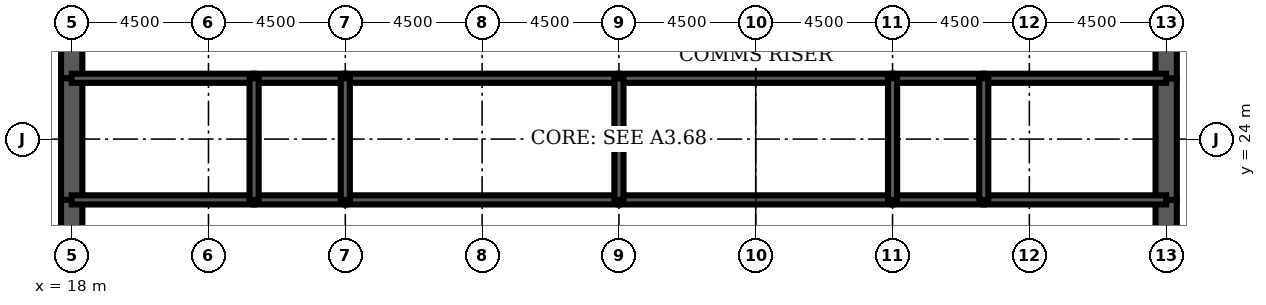
"""IFC4 building model, lengths in metres.
Left out: names, types, materials, properties, quantities, classifications, styles, units other than length and angle.
Written with IfcOpenShell. Run it as: python <this file> out.ifc"""

import sys

from ifc_helpers import new_model, si_unit, direction, frame, frame_2d, origin, place, context, subcontext, project, spatial, rectangle, extrude, element, fill, save


model = new_model("IFC4")
c1 = context("Model", 3, precision=1e-05, world=origin(), true_north=direction((0.0, 1.0)))
c2 = subcontext(c1, "Body", "Model", "MODEL_VIEW")
j1 = project(units=[si_unit("LENGTHUNIT", "METRE"), si_unit("PLANEANGLEUNIT", "RADIAN")], contexts=[c1])
p1 = place(None, origin())
s1 = spatial("IfcSite", under=j1, at=p1, CompositionType="ELEMENT")
p2 = place(p1, origin())
s2 = spatial("IfcBuilding", under=s1, at=p2, CompositionType="ELEMENT")
p3 = place(p2, frame((0.0, 0.0, 292.1)))
s3 = spatial("IfcBuildingStorey", under=s2, at=p3, CompositionType="ELEMENT", Elevation=292.1)
p4 = place(p3, frame((18.0, 28.8, 0.0), z_axis=(0.0, 0.0, 1.0), x_axis=(0.0, -1.0, 0.0)))
e1 = element("IfcWall", 1, at=p4, inside=s3, PredefinedType="SHEAR", context=c2, shape_type="SweptSolid", body=[
    extrude(rectangle(XDim=2.8, YDim=0.7, at=frame_2d((1.4, 0.0))), origin(), (0.0, 0.0, 1.0), 4.2),
])
p5 = place(p4, frame((0.4, 0.0, 0.0)))
e2 = element("IfcOpeningElement", 2, at=p5, cuts=e1, PredefinedType="OPENING", context=c2, shape_type="SweptSolid", body=[
    extrude(rectangle(XDim=1.8, YDim=2.1, at=frame_2d((0.9, 1.05))), frame((0.0, 0.36, 0.0), z_axis=(0.0, -1.0, 0.0), x_axis=(1.0, 0.0, 0.0)), (0.0, 0.0, 1.0), 0.72),
])
p6 = place(p3, frame((18.0, 26.0, 0.0), z_axis=(0.0, 0.0, 1.0), x_axis=(0.0, -1.0, 0.0)))
e3 = element("IfcWall", 3, at=p6, inside=s3, PredefinedType="SHEAR", context=c2, shape_type="SweptSolid", body=[
    extrude(rectangle(XDim=4.0, YDim=0.7, at=frame_2d((2.0, 0.0))), origin(), (0.0, 0.0, 1.0), 4.2),
])
p7 = place(p3, frame((18.0, 22.0, 0.0), z_axis=(0.0, 0.0, 1.0), x_axis=(0.0, -1.0, 0.0)))
e4 = element("IfcWall", 4, at=p7, inside=s3, PredefinedType="SHEAR", context=c2, shape_type="SweptSolid", body=[
    extrude(rectangle(XDim=2.8, YDim=0.7, at=frame_2d((1.4, 0.0))), origin(), (0.0, 0.0, 1.0), 4.2),
])
p8 = place(p7, frame((0.6, 0.0, 0.0)))
e5 = element("IfcOpeningElement", 5, at=p8, cuts=e4, PredefinedType="OPENING", context=c2, shape_type="SweptSolid", body=[
    extrude(rectangle(XDim=1.8, YDim=2.1, at=frame_2d((0.9, 1.05))), frame((0.0, 0.36, 0.0), z_axis=(0.0, -1.0, 0.0), x_axis=(1.0, 0.0, 0.0)), (0.0, 0.0, 1.0), 0.72),
])
p9 = place(p3, frame((54.0, 19.2, 0.0), z_axis=(0.0, 0.0, 1.0), x_axis=(0.0, 1.0, 0.0)))
e6 = element("IfcWall", 6, at=p9, inside=s3, PredefinedType="SHEAR", context=c2, shape_type="SweptSolid", body=[
    extrude(rectangle(XDim=2.8, YDim=0.7, at=frame_2d((1.4, 0.0))), origin(), (0.0, 0.0, 1.0), 4.2),
])
p10 = place(p9, frame((0.4, 0.0, 0.0)))
e7 = element("IfcOpeningElement", 7, at=p10, cuts=e6, PredefinedType="OPENING", context=c2, shape_type="SweptSolid", body=[
    extrude(rectangle(XDim=1.8, YDim=2.1, at=frame_2d((0.9, 1.05))), frame((0.0, 0.36, 0.0), z_axis=(0.0, -1.0, 0.0), x_axis=(1.0, 0.0, 0.0)), (0.0, 0.0, 1.0), 0.72),
])
p11 = place(p3, frame((54.0, 22.0, 0.0), z_axis=(0.0, 0.0, 1.0), x_axis=(0.0, 1.0, 0.0)))
e8 = element("IfcWall", 8, at=p11, inside=s3, PredefinedType="SHEAR", context=c2, shape_type="SweptSolid", body=[
    extrude(rectangle(XDim=4.0, YDim=0.7, at=frame_2d((2.0, 0.0))), origin(), (0.0, 0.0, 1.0), 4.2),
])
p12 = place(p3, frame((54.0, 26.0, 0.0), z_axis=(0.0, 0.0, 1.0), x_axis=(0.0, 1.0, 0.0)))
e9 = element("IfcWall", 9, at=p12, inside=s3, PredefinedType="SHEAR", context=c2, shape_type="SweptSolid", body=[
    extrude(rectangle(XDim=2.8, YDim=0.7, at=frame_2d((1.4, 0.0))), origin(), (0.0, 0.0, 1.0), 4.2),
])
p13 = place(p12, frame((0.6, 0.0, 0.0)))
e10 = element("IfcOpeningElement", 10, at=p13, cuts=e9, PredefinedType="OPENING", context=c2, shape_type="SweptSolid", body=[
    extrude(rectangle(XDim=1.8, YDim=2.1, at=frame_2d((0.9, 1.05))), frame((0.0, 0.36, 0.0), z_axis=(0.0, -1.0, 0.0), x_axis=(1.0, 0.0, 0.0)), (0.0, 0.0, 1.0), 0.72),
])
p14 = place(p3, frame((18.0, 22.0, 0.0), z_axis=(0.0, 0.0, 1.0), x_axis=(1.0, 0.0, 0.0)))
e11 = element("IfcWall", 11, at=p14, inside=s3, PredefinedType="SOLIDWALL", context=c2, shape_type="SweptSolid", body=[
    extrude(rectangle(XDim=6.0, YDim=0.3, at=frame_2d((3.0, 0.0))), origin(), (0.0, 0.0, 1.0), 4.2),
])
p15 = place(p14, frame((2.0, 0.0, 0.0)))
e12 = element("IfcOpeningElement", 12, at=p15, cuts=e11, PredefinedType="OPENING", context=c2, shape_type="SweptSolid", body=[
    extrude(rectangle(XDim=1.0, YDim=2.1, at=frame_2d((0.5, 1.05))), frame((0.0, 0.16, 0.0), z_axis=(0.0, -1.0, 0.0), x_axis=(1.0, 0.0, 0.0)), (0.0, 0.0, 1.0), 0.32),
])
p16 = place(p3, frame((24.0, 22.0, 0.0), z_axis=(0.0, 0.0, 1.0), x_axis=(1.0, 0.0, 0.0)))
e13 = element("IfcWall", 13, at=p16, inside=s3, PredefinedType="SOLIDWALL", context=c2, shape_type="SweptSolid", body=[
    extrude(rectangle(XDim=3.0, YDim=0.3, at=frame_2d((1.5, 0.0))), origin(), (0.0, 0.0, 1.0), 4.2),
])
p17 = place(p16, frame((1.0, 0.0, 0.0)))
e14 = element("IfcOpeningElement", 14, at=p17, cuts=e13, PredefinedType="OPENING", context=c2, shape_type="SweptSolid", body=[
    extrude(rectangle(XDim=1.0, YDim=2.1, at=frame_2d((0.5, 1.05))), frame((0.0, 0.16, 0.0), z_axis=(0.0, -1.0, 0.0), x_axis=(1.0, 0.0, 0.0)), (0.0, 0.0, 1.0), 0.32),
])
p18 = place(p3, frame((27.0, 22.0, 0.0), z_axis=(0.0, 0.0, 1.0), x_axis=(1.0, 0.0, 0.0)))
e15 = element("IfcWall", 15, at=p18, inside=s3, PredefinedType="SOLIDWALL", context=c2, shape_type="SweptSolid", body=[
    extrude(rectangle(XDim=9.0, YDim=0.3, at=frame_2d((4.5, 0.0))), origin(), (0.0, 0.0, 1.0), 4.2),
])
p19 = place(p18, frame((4.0, 0.0, 0.0)))
e16 = element("IfcOpeningElement", 16, at=p19, cuts=e15, PredefinedType="OPENING", context=c2, shape_type="SweptSolid", body=[
    extrude(rectangle(XDim=1.0, YDim=2.1, at=frame_2d((0.5, 1.05))), frame((0.0, 0.16, 0.0), z_axis=(0.0, -1.0, 0.0), x_axis=(1.0, 0.0, 0.0)), (0.0, 0.0, 1.0), 0.32),
])
p20 = place(p3, frame((36.0, 22.0, 0.0), z_axis=(0.0, 0.0, 1.0), x_axis=(1.0, 0.0, 0.0)))
e17 = element("IfcWall", 17, at=p20, inside=s3, PredefinedType="SOLIDWALL", context=c2, shape_type="SweptSolid", body=[
    extrude(rectangle(XDim=9.0, YDim=0.3, at=frame_2d((4.5, 0.0))), origin(), (0.0, 0.0, 1.0), 4.2),
])
p21 = place(p20, frame((4.0, 0.0, 0.0)))
e18 = element("IfcOpeningElement", 18, at=p21, cuts=e17, PredefinedType="OPENING", context=c2, shape_type="SweptSolid", body=[
    extrude(rectangle(XDim=1.0, YDim=2.1, at=frame_2d((0.5, 1.05))), frame((0.0, 0.16, 0.0), z_axis=(0.0, -1.0, 0.0), x_axis=(1.0, 0.0, 0.0)), (0.0, 0.0, 1.0), 0.32),
])
p22 = place(p3, frame((45.0, 22.0, 0.0), z_axis=(0.0, 0.0, 1.0), x_axis=(1.0, 0.0, 0.0)))
e19 = element("IfcWall", 19, at=p22, inside=s3, PredefinedType="SOLIDWALL", context=c2, shape_type="SweptSolid", body=[
    extrude(rectangle(XDim=3.0, YDim=0.3, at=frame_2d((1.5, 0.0))), origin(), (0.0, 0.0, 1.0), 4.2),
])
p23 = place(p22, frame((1.0, 0.0, 0.0)))
e20 = element("IfcOpeningElement", 20, at=p23, cuts=e19, PredefinedType="OPENING", context=c2, shape_type="SweptSolid", body=[
    extrude(rectangle(XDim=1.0, YDim=2.1, at=frame_2d((0.5, 1.05))), frame((0.0, 0.16, 0.0), z_axis=(0.0, -1.0, 0.0), x_axis=(1.0, 0.0, 0.0)), (0.0, 0.0, 1.0), 0.32),
])
p24 = place(p3, frame((48.0, 22.0, 0.0), z_axis=(0.0, 0.0, 1.0), x_axis=(1.0, 0.0, 0.0)))
e21 = element("IfcWall", 21, at=p24, inside=s3, PredefinedType="SOLIDWALL", context=c2, shape_type="SweptSolid", body=[
    extrude(rectangle(XDim=6.0, YDim=0.3, at=frame_2d((3.0, 0.0))), origin(), (0.0, 0.0, 1.0), 4.2),
])
p25 = place(p24, frame((2.0, 0.0, 0.0)))
e22 = element("IfcOpeningElement", 22, at=p25, cuts=e21, PredefinedType="OPENING", context=c2, shape_type="SweptSolid", body=[
    extrude(rectangle(XDim=1.0, YDim=2.1, at=frame_2d((0.5, 1.05))), frame((0.0, 0.16, 0.0), z_axis=(0.0, -1.0, 0.0), x_axis=(1.0, 0.0, 0.0)), (0.0, 0.0, 1.0), 0.32),
])
p26 = place(p24, frame((4.25, 0.0, 0.0)))
e23 = element("IfcOpeningElement", 23, at=p26, cuts=e21, PredefinedType="OPENING", context=c2, shape_type="SweptSolid", body=[
    extrude(rectangle(XDim=1.0, YDim=2.1, at=frame_2d((0.5, 1.05))), frame((0.0, 0.16, 0.0), z_axis=(0.0, -1.0, 0.0), x_axis=(1.0, 0.0, 0.0)), (0.0, 0.0, 1.0), 0.32),
])
p27 = place(p3, frame((18.0, 26.0, 0.0), z_axis=(0.0, 0.0, 1.0), x_axis=(1.0, 0.0, 0.0)))
e24 = element("IfcWall", 24, at=p27, inside=s3, PredefinedType="SOLIDWALL", context=c2, shape_type="SweptSolid", body=[
    extrude(rectangle(XDim=6.0, YDim=0.3, at=frame_2d((3.0, 0.0))), origin(), (0.0, 0.0, 1.0), 4.2),
])
p28 = place(p3, frame((24.0, 26.0, 0.0), z_axis=(0.0, 0.0, 1.0), x_axis=(1.0, 0.0, 0.0)))
e25 = element("IfcWall", 25, at=p28, inside=s3, PredefinedType="SOLIDWALL", context=c2, shape_type="SweptSolid", body=[
    extrude(rectangle(XDim=3.0, YDim=0.3, at=frame_2d((1.5, 0.0))), origin(), (0.0, 0.0, 1.0), 4.2),
])
for number, where, z_axis, x_axis in (
    (26, (27.0, 26.0, 0.0), (0.0, 0.0, 1.0), (1.0, 0.0, 0.0)),
    (27, (36.0, 26.0, 0.0), (0.0, 0.0, 1.0), (1.0, 0.0, 0.0)),
):
    element("IfcWall", number, at=place(p3, frame(where, z_axis=z_axis, x_axis=x_axis)), inside=s3, PredefinedType="SOLIDWALL", context=c2, shape_type="SweptSolid", body=[
        extrude(rectangle(XDim=9.0, YDim=0.3, at=frame_2d((4.5, 0.0))), origin(), (0.0, 0.0, 1.0), 4.2),
    ])
p29 = place(p3, frame((45.0, 26.0, 0.0), z_axis=(0.0, 0.0, 1.0), x_axis=(1.0, 0.0, 0.0)))
e28 = element("IfcWall", 28, at=p29, inside=s3, PredefinedType="SOLIDWALL", context=c2, shape_type="SweptSolid", body=[
    extrude(rectangle(XDim=3.0, YDim=0.3, at=frame_2d((1.5, 0.0))), origin(), (0.0, 0.0, 1.0), 4.2),
])
p30 = place(p3, frame((48.0, 26.0, 0.0), z_axis=(0.0, 0.0, 1.0), x_axis=(1.0, 0.0, 0.0)))
e29 = element("IfcWall", 29, at=p30, inside=s3, PredefinedType="SOLIDWALL", context=c2, shape_type="SweptSolid", body=[
    extrude(rectangle(XDim=6.0, YDim=0.3, at=frame_2d((3.0, 0.0))), origin(), (0.0, 0.0, 1.0), 4.2),
])
for number, where, z_axis, x_axis in (
    (30, (24.0, 22.0, 0.0), (0.0, 0.0, 1.0), (0.0, 1.0, 0.0)),
    (31, (27.0, 22.0, 0.0), (0.0, 0.0, 1.0), (0.0, 1.0, 0.0)),
    (32, (36.0, 22.0, 0.0), (0.0, 0.0, 1.0), (0.0, 1.0, 0.0)),
    (33, (45.0, 22.0, 0.0), (0.0, 0.0, 1.0), (0.0, 1.0, 0.0)),
    (34, (48.0, 22.0, 0.0), (0.0, 0.0, 1.0), (0.0, 1.0, 0.0)),
):
    element("IfcWall", number, at=place(p3, frame(where, z_axis=z_axis, x_axis=x_axis)), inside=s3, PredefinedType="SOLIDWALL", context=c2, shape_type="SweptSolid", body=[
        extrude(rectangle(XDim=4.0, YDim=0.3, at=frame_2d((2.0, 0.0))), origin(), (0.0, 0.0, 1.0), 4.2),
    ])
p31 = place(p3, frame((39.0, 22.15, 0.0), z_axis=(0.0, 0.0, 1.0), x_axis=(0.0, 1.0, 0.0)))
e35 = element("IfcWall", 35, at=p31, inside=s3, PredefinedType="PARTITIONING", context=c2, shape_type="SweptSolid", body=[
    extrude(rectangle(XDim=3.7, YDim=0.15, at=frame_2d((1.85, 0.0))), origin(), (0.0, 0.0, 1.0), 3.0),
])
p32 = place(p31, frame((2.2, 0.0, 0.0)))
e36 = element("IfcOpeningElement", 36, at=p32, cuts=e35, PredefinedType="OPENING", context=c2, shape_type="SweptSolid", body=[
    extrude(rectangle(XDim=1.0, YDim=2.1, at=frame_2d((0.5, 1.05))), frame((0.0, 0.085, 0.0), z_axis=(0.0, -1.0, 0.0), x_axis=(1.0, 0.0, 0.0)), (0.0, 0.0, 1.0), 0.17),
])
p33 = place(p3, frame((51.775, 22.15, 0.0), z_axis=(0.0, 0.0, 1.0), x_axis=(0.0, 1.0, 0.0)))
e37 = element("IfcWall", 37, at=p33, inside=s3, PredefinedType="PARTITIONING", context=c2, shape_type="SweptSolid", body=[
    extrude(rectangle(XDim=3.7, YDim=0.15, at=frame_2d((1.85, 0.0))), origin(), (0.0, 0.0, 1.0), 3.0),
])
p34 = place(p32, origin())
e38 = element("IfcDoor", 38, at=p34, inside=s3, OperationType="SINGLE_SWING_RIGHT", PredefinedType="DOOR", context=c2, shape_type="SweptSolid", body=[
    extrude(rectangle(XDim=1.0, YDim=2.1, at=frame_2d((0.5, 1.05))), frame((0.0, 0.025, 0.0), z_axis=(0.0, -1.0, 0.0), x_axis=(1.0, 0.0, 0.0)), (0.0, 0.0, 1.0), 0.05),
])
fill(e36, e38)
p35 = place(p8, origin())
e39 = element("IfcDoor", 39, at=p35, inside=s3, OperationType="SINGLE_SWING_LEFT", PredefinedType="DOOR", context=c2, shape_type="SweptSolid", body=[
    extrude(rectangle(XDim=1.8, YDim=2.1, at=frame_2d((0.9, 1.05))), frame((0.0, 0.35, 0.0), z_axis=(0.0, -1.0, 0.0), x_axis=(1.0, 0.0, 0.0)), (0.0, 0.0, 1.0), 0.699),
])
fill(e5, e39)
p36 = place(p5, origin())
e40 = element("IfcDoor", 40, at=p36, inside=s3, OperationType="SINGLE_SWING_LEFT", PredefinedType="DOOR", context=c2, shape_type="SweptSolid", body=[
    extrude(rectangle(XDim=1.8, YDim=2.1, at=frame_2d((0.9, 1.05))), frame((0.0, 0.35, 0.0), z_axis=(0.0, -1.0, 0.0), x_axis=(1.0, 0.0, 0.0)), (0.0, 0.0, 1.0), 0.699),
])
fill(e2, e40)
p37 = place(p10, origin())
e41 = element("IfcDoor", 41, at=p37, inside=s3, OperationType="SINGLE_SWING_LEFT", PredefinedType="DOOR", context=c2, shape_type="SweptSolid", body=[
    extrude(rectangle(XDim=1.8, YDim=2.1, at=frame_2d((0.9, 1.05))), frame((0.0, 0.35, 0.0), z_axis=(0.0, -1.0, 0.0), x_axis=(1.0, 0.0, 0.0)), (0.0, 0.0, 1.0), 0.699),
])
fill(e7, e41)
p38 = place(p13, origin())
e42 = element("IfcDoor", 42, at=p38, inside=s3, OperationType="SINGLE_SWING_LEFT", PredefinedType="DOOR", context=c2, shape_type="SweptSolid", body=[
    extrude(rectangle(XDim=1.8, YDim=2.1, at=frame_2d((0.9, 1.05))), frame((0.0, 0.35, 0.0), z_axis=(0.0, -1.0, 0.0), x_axis=(1.0, 0.0, 0.0)), (0.0, 0.0, 1.0), 0.699),
])
fill(e10, e42)
p39 = place(p15, origin())
e43 = element("IfcDoor", 43, at=p39, inside=s3, OperationType="SINGLE_SWING_LEFT", PredefinedType="DOOR", context=c2, shape_type="SweptSolid", body=[
    extrude(rectangle(XDim=1.0, YDim=2.1, at=frame_2d((0.5, 1.05))), frame((0.0, 0.025, 0.0), z_axis=(0.0, -1.0, 0.0), x_axis=(1.0, 0.0, 0.0)), (0.0, 0.0, 1.0), 0.05),
])
fill(e12, e43)
p40 = place(p17, origin())
e44 = element("IfcDoor", 44, at=p40, inside=s3, OperationType="SINGLE_SWING_LEFT", PredefinedType="DOOR", context=c2, shape_type="SweptSolid", body=[
    extrude(rectangle(XDim=1.0, YDim=2.1, at=frame_2d((0.5, 1.05))), frame((0.0, 0.025, 0.0), z_axis=(0.0, -1.0, 0.0), x_axis=(1.0, 0.0, 0.0)), (0.0, 0.0, 1.0), 0.05),
])
fill(e14, e44)
p41 = place(p19, origin())
e45 = element("IfcDoor", 45, at=p41, inside=s3, OperationType="SINGLE_SWING_LEFT", PredefinedType="DOOR", context=c2, shape_type="SweptSolid", body=[
    extrude(rectangle(XDim=1.0, YDim=2.1, at=frame_2d((0.5, 1.05))), frame((0.0, 0.025, 0.0), z_axis=(0.0, -1.0, 0.0), x_axis=(1.0, 0.0, 0.0)), (0.0, 0.0, 1.0), 0.05),
])
fill(e16, e45)
p42 = place(p21, origin())
e46 = element("IfcDoor", 46, at=p42, inside=s3, OperationType="SINGLE_SWING_LEFT", PredefinedType="DOOR", context=c2, shape_type="SweptSolid", body=[
    extrude(rectangle(XDim=1.0, YDim=2.1, at=frame_2d((0.5, 1.05))), frame((0.0, 0.025, 0.0), z_axis=(0.0, -1.0, 0.0), x_axis=(1.0, 0.0, 0.0)), (0.0, 0.0, 1.0), 0.05),
])
fill(e18, e46)
p43 = place(p23, origin())
e47 = element("IfcDoor", 47, at=p43, inside=s3, OperationType="SINGLE_SWING_LEFT", PredefinedType="DOOR", context=c2, shape_type="SweptSolid", body=[
    extrude(rectangle(XDim=1.0, YDim=2.1, at=frame_2d((0.5, 1.05))), frame((0.0, 0.025, 0.0), z_axis=(0.0, -1.0, 0.0), x_axis=(1.0, 0.0, 0.0)), (0.0, 0.0, 1.0), 0.05),
])
fill(e20, e47)
p44 = place(p25, origin())
e48 = element("IfcDoor", 48, at=p44, inside=s3, OperationType="SINGLE_SWING_LEFT", PredefinedType="DOOR", context=c2, shape_type="SweptSolid", body=[
    extrude(rectangle(XDim=1.0, YDim=2.1, at=frame_2d((0.5, 1.05))), frame((0.0, 0.025, 0.0), z_axis=(0.0, -1.0, 0.0), x_axis=(1.0, 0.0, 0.0)), (0.0, 0.0, 1.0), 0.05),
])
fill(e22, e48)
p45 = place(p26, origin())
e49 = element("IfcDoor", 49, at=p45, inside=s3, OperationType="SINGLE_SWING_RIGHT", PredefinedType="DOOR", context=c2, shape_type="SweptSolid", body=[
    extrude(rectangle(XDim=1.0, YDim=2.1, at=frame_2d((0.5, 1.05))), frame((0.0, 0.025, 0.0), z_axis=(0.0, -1.0, 0.0), x_axis=(1.0, 0.0, 0.0)), (0.0, 0.0, 1.0), 0.05),
])
fill(e23, e49)
save(model, sys.argv[1])
